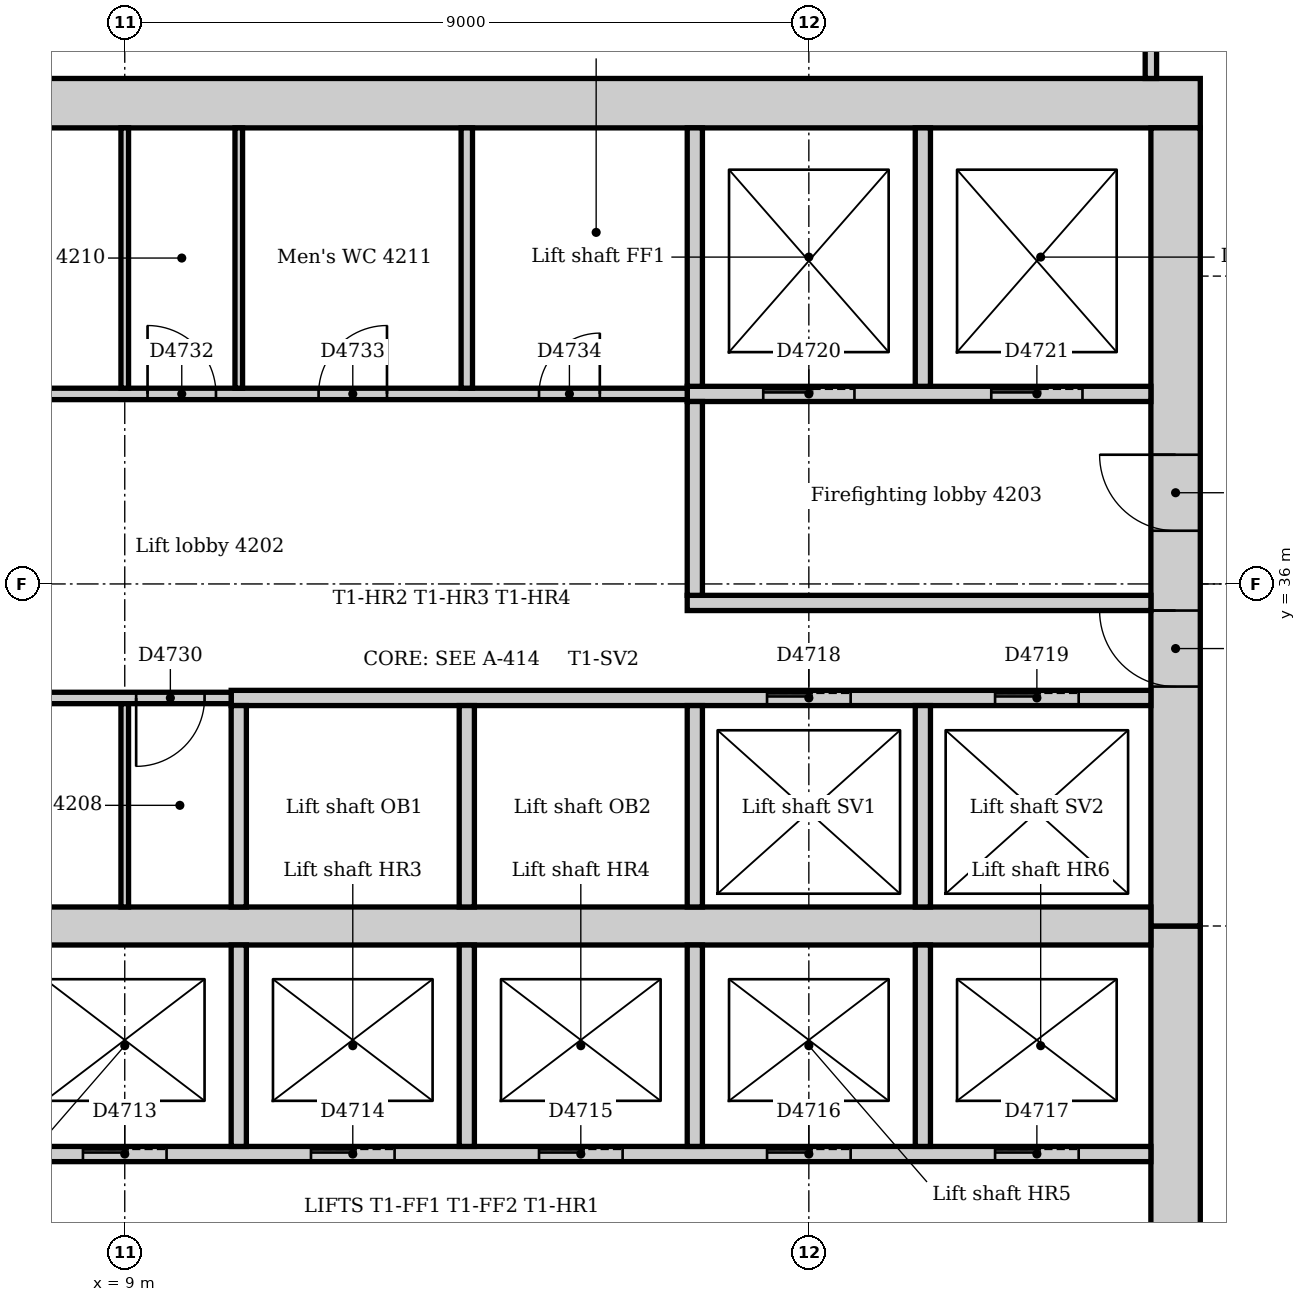
"""IFC4 building model, lengths in metres.
Left out: names, types, materials, properties, quantities, classifications, styles, units other than length and angle.
Written with IfcOpenShell. Run it as: python <this file> out.ifc"""

import sys

from ifc_helpers import new_model, si_unit, direction, frame, frame_2d, origin, place, context, subcontext, project, spatial, rectangle, extrude, element, fill, save


model = new_model("IFC4")
c1 = context("Model", 3, precision=1e-05, world=origin(), true_north=direction((0.0, 1.0)))
c2 = subcontext(c1, "Body", "Model", "MODEL_VIEW")
j1 = project(units=[si_unit("LENGTHUNIT", "METRE"), si_unit("PLANEANGLEUNIT", "RADIAN")], contexts=[c1])
p1 = place(None, origin())
s1 = spatial("IfcSite", under=j1, at=p1, CompositionType="ELEMENT")
p2 = place(p1, origin())
s2 = spatial("IfcBuilding", under=s1, at=p2, CompositionType="ELEMENT")
p3 = place(p2, frame((0.0, 0.0, 177.0)))
s3 = spatial("IfcBuildingStorey", under=s2, at=p3, CompositionType="ELEMENT", Elevation=177.0)
p4 = place(p3, frame((23.15, 42.325, 0.0), z_axis=(0.0, 0.0, 1.0), x_axis=(-1.0, 0.0, 0.0)))
e1 = element("IfcWall", 1, at=p4, inside=s3, PredefinedType="SOLIDWALL", context=c2, shape_type="SweptSolid", body=[
    extrude(rectangle(XDim=19.25, YDim=0.65, at=frame_2d((9.625, 0.0))), origin(), (0.0, 0.0, 1.0), 4.0),
])
p5 = place(p3, frame((22.825, 21.0, 0.0), z_axis=(0.0, 0.0, 1.0), x_axis=(0.0, 1.0, 0.0)))
e2 = element("IfcWall", 2, at=p5, inside=s3, PredefinedType="SOLIDWALL", context=c2, shape_type="SweptSolid", body=[
    extrude(rectangle(XDim=10.5, YDim=0.65, at=frame_2d((5.25, 0.0))), origin(), (0.0, 0.0, 1.0), 4.0),
])
p6 = place(p5, frame((4.35, 0.0, 0.0)))
e3 = element("IfcOpeningElement", 3, at=p6, cuts=e2, PredefinedType="OPENING", context=c2, shape_type="SweptSolid", body=[
    extrude(rectangle(XDim=1.8, YDim=2.1, at=frame_2d((0.9, 1.05))), frame((0.0, 0.335, 0.0), z_axis=(0.0, -1.0, 0.0), x_axis=(1.0, 0.0, 0.0)), (0.0, 0.0, 1.0), 0.67),
])
p7 = place(p3, frame((22.825, 31.5, 0.0), z_axis=(0.0, 0.0, 1.0), x_axis=(0.0, 1.0, 0.0)))
e4 = element("IfcWall", 4, at=p7, inside=s3, PredefinedType="SOLIDWALL", context=c2, shape_type="SweptSolid", body=[
    extrude(rectangle(XDim=10.5, YDim=0.65, at=frame_2d((5.25, 0.0))), origin(), (0.0, 0.0, 1.0), 4.0),
])
p8 = place(p7, frame((3.15, 0.0, 0.0)))
e5 = element("IfcOpeningElement", 5, at=p8, cuts=e4, PredefinedType="OPENING", context=c2, shape_type="SweptSolid", body=[
    extrude(rectangle(XDim=1.0, YDim=2.1, at=frame_2d((0.5, 1.05))), frame((0.0, 0.335, 0.0), z_axis=(0.0, -1.0, 0.0), x_axis=(1.0, 0.0, 0.0)), (0.0, 0.0, 1.0), 0.67),
])
p9 = place(p7, frame((5.2, 0.0, 0.0)))
e6 = element("IfcOpeningElement", 6, at=p9, cuts=e4, PredefinedType="OPENING", context=c2, shape_type="SweptSolid", body=[
    extrude(rectangle(XDim=1.0, YDim=2.1, at=frame_2d((0.5, 1.05))), frame((0.0, 0.335, 0.0), z_axis=(0.0, -1.0, 0.0), x_axis=(1.0, 0.0, 0.0)), (0.0, 0.0, 1.0), 0.67),
])
p10 = place(p3, frame((4.5, 31.5, 0.0), z_axis=(0.0, 0.0, 1.0), x_axis=(1.0, 0.0, 0.0)))
e7 = element("IfcWall", 7, at=p10, inside=s3, PredefinedType="SOLIDWALL", context=c2, shape_type="SweptSolid", body=[
    extrude(rectangle(XDim=18.0, YDim=0.5, at=frame_2d((9.0, 0.0))), origin(), (0.0, 0.0, 1.0), 4.0),
])
p11 = place(p3, frame((16.4, 35.75, 0.0), z_axis=(0.0, 0.0, 1.0), x_axis=(1.0, 0.0, 0.0)))
e8 = element("IfcWall", 8, at=p11, inside=s3, PredefinedType="PARTITIONING", context=c2, shape_type="SweptSolid", body=[
    extrude(rectangle(XDim=6.1, YDim=0.2, at=frame_2d((3.05, 0.0))), origin(), (0.0, 0.0, 1.0), 3.85),
])
p12 = place(p3, frame((16.4, 38.5, 0.0), z_axis=(0.0, 0.0, 1.0), x_axis=(1.0, 0.0, 0.0)))
e9 = element("IfcWall", 9, at=p12, inside=s3, PredefinedType="PARTITIONING", context=c2, shape_type="SweptSolid", body=[
    extrude(rectangle(XDim=6.1, YDim=0.2, at=frame_2d((3.05, 0.0))), origin(), (0.0, 0.0, 1.0), 3.85),
])
p13 = place(p12, frame((1.0, 0.0, 0.0)))
e10 = element("IfcOpeningElement", 10, at=p13, cuts=e9, PredefinedType="OPENING", context=c2, shape_type="SweptSolid", body=[
    extrude(rectangle(XDim=1.2, YDim=2.1, at=frame_2d((0.6, 1.05))), frame((0.0, 0.11, 0.0), z_axis=(0.0, -1.0, 0.0), x_axis=(1.0, 0.0, 0.0)), (0.0, 0.0, 1.0), 0.22),
])
p14 = place(p12, frame((4.0, 0.0, 0.0)))
e11 = element("IfcOpeningElement", 11, at=p14, cuts=e9, PredefinedType="OPENING", context=c2, shape_type="SweptSolid", body=[
    extrude(rectangle(XDim=1.2, YDim=2.1, at=frame_2d((0.6, 1.05))), frame((0.0, 0.11, 0.0), z_axis=(0.0, -1.0, 0.0), x_axis=(1.0, 0.0, 0.0)), (0.0, 0.0, 1.0), 0.22),
])
p15 = place(p3, frame((16.5, 35.85, 0.0), z_axis=(0.0, 0.0, 1.0), x_axis=(0.0, 1.0, 0.0)))
e12 = element("IfcWall", 12, at=p15, inside=s3, PredefinedType="PARTITIONING", context=c2, shape_type="SweptSolid", body=[
    extrude(rectangle(XDim=2.55, YDim=0.2, at=frame_2d((1.275, 0.0))), origin(), (0.0, 0.0, 1.0), 3.85),
])
p16 = place(p3, frame((4.5, 28.5, 0.0), z_axis=(0.0, 0.0, 1.0), x_axis=(1.0, 0.0, 0.0)))
e13 = element("IfcWall", 13, at=p16, inside=s3, PredefinedType="PARTITIONING", context=c2, shape_type="SweptSolid", body=[
    extrude(rectangle(XDim=18.0, YDim=0.2, at=frame_2d((9.0, 0.0))), origin(), (0.0, 0.0, 1.0), 3.85),
])
p17 = place(p16, frame((0.95, 0.0, 0.0)))
e14 = element("IfcOpeningElement", 14, at=p17, cuts=e13, PredefinedType="OPENING", context=c2, shape_type="SweptSolid", body=[
    extrude(rectangle(XDim=1.1, YDim=2.1, at=frame_2d((0.55, 1.05))), frame((0.0, 0.11, 0.0), z_axis=(0.0, -1.0, 0.0), x_axis=(1.0, 0.0, 0.0)), (0.0, 0.0, 1.0), 0.22),
])
p18 = place(p16, frame((3.95, 0.0, 0.0)))
e15 = element("IfcOpeningElement", 15, at=p18, cuts=e13, PredefinedType="OPENING", context=c2, shape_type="SweptSolid", body=[
    extrude(rectangle(XDim=1.1, YDim=2.1, at=frame_2d((0.55, 1.05))), frame((0.0, 0.11, 0.0), z_axis=(0.0, -1.0, 0.0), x_axis=(1.0, 0.0, 0.0)), (0.0, 0.0, 1.0), 0.22),
])
p19 = place(p16, frame((6.95, 0.0, 0.0)))
e16 = element("IfcOpeningElement", 16, at=p19, cuts=e13, PredefinedType="OPENING", context=c2, shape_type="SweptSolid", body=[
    extrude(rectangle(XDim=1.1, YDim=2.1, at=frame_2d((0.55, 1.05))), frame((0.0, 0.11, 0.0), z_axis=(0.0, -1.0, 0.0), x_axis=(1.0, 0.0, 0.0)), (0.0, 0.0, 1.0), 0.22),
])
p20 = place(p16, frame((9.95, 0.0, 0.0)))
e17 = element("IfcOpeningElement", 17, at=p20, cuts=e13, PredefinedType="OPENING", context=c2, shape_type="SweptSolid", body=[
    extrude(rectangle(XDim=1.1, YDim=2.1, at=frame_2d((0.55, 1.05))), frame((0.0, 0.11, 0.0), z_axis=(0.0, -1.0, 0.0), x_axis=(1.0, 0.0, 0.0)), (0.0, 0.0, 1.0), 0.22),
])
p21 = place(p16, frame((12.95, 0.0, 0.0)))
e18 = element("IfcOpeningElement", 18, at=p21, cuts=e13, PredefinedType="OPENING", context=c2, shape_type="SweptSolid", body=[
    extrude(rectangle(XDim=1.1, YDim=2.1, at=frame_2d((0.55, 1.05))), frame((0.0, 0.11, 0.0), z_axis=(0.0, -1.0, 0.0), x_axis=(1.0, 0.0, 0.0)), (0.0, 0.0, 1.0), 0.22),
])
p22 = place(p16, frame((15.95, 0.0, 0.0)))
e19 = element("IfcOpeningElement", 19, at=p22, cuts=e13, PredefinedType="OPENING", context=c2, shape_type="SweptSolid", body=[
    extrude(rectangle(XDim=1.1, YDim=2.1, at=frame_2d((0.55, 1.05))), frame((0.0, 0.11, 0.0), z_axis=(0.0, -1.0, 0.0), x_axis=(1.0, 0.0, 0.0)), (0.0, 0.0, 1.0), 0.22),
])
p23 = place(p3, frame((10.4, 34.5, 0.0), z_axis=(0.0, 0.0, 1.0), x_axis=(1.0, 0.0, 0.0)))
e20 = element("IfcWall", 20, at=p23, inside=s3, PredefinedType="PARTITIONING", context=c2, shape_type="SweptSolid", body=[
    extrude(rectangle(XDim=12.1, YDim=0.2, at=frame_2d((6.05, 0.0))), origin(), (0.0, 0.0, 1.0), 3.85),
])
p24 = place(p23, frame((7.05, 0.0, 0.0)))
e21 = element("IfcOpeningElement", 21, at=p24, cuts=e20, PredefinedType="OPENING", context=c2, shape_type="SweptSolid", body=[
    extrude(rectangle(XDim=1.1, YDim=2.1, at=frame_2d((0.55, 1.05))), frame((0.0, 0.11, 0.0), z_axis=(0.0, -1.0, 0.0), x_axis=(1.0, 0.0, 0.0)), (0.0, 0.0, 1.0), 0.22),
])
p25 = place(p23, frame((10.05, 0.0, 0.0)))
e22 = element("IfcOpeningElement", 22, at=p25, cuts=e20, PredefinedType="OPENING", context=c2, shape_type="SweptSolid", body=[
    extrude(rectangle(XDim=1.1, YDim=2.1, at=frame_2d((0.55, 1.05))), frame((0.0, 0.11, 0.0), z_axis=(0.0, -1.0, 0.0), x_axis=(1.0, 0.0, 0.0)), (0.0, 0.0, 1.0), 0.22),
])
for number, where, z_axis, x_axis in (
    (23, (10.5, 28.6, 0.0), (0.0, 0.0, 1.0), (0.0, 1.0, 0.0)),
    (24, (10.5, 31.75, 0.0), (0.0, 0.0, 1.0), (0.0, 1.0, 0.0)),
    (25, (13.5, 28.6, 0.0), (0.0, 0.0, 1.0), (0.0, 1.0, 0.0)),
    (26, (13.5, 31.75, 0.0), (0.0, 0.0, 1.0), (0.0, 1.0, 0.0)),
    (27, (16.5, 28.6, 0.0), (0.0, 0.0, 1.0), (0.0, 1.0, 0.0)),
    (28, (16.5, 31.75, 0.0), (0.0, 0.0, 1.0), (0.0, 1.0, 0.0)),
    (29, (19.5, 28.6, 0.0), (0.0, 0.0, 1.0), (0.0, 1.0, 0.0)),
    (30, (19.5, 31.75, 0.0), (0.0, 0.0, 1.0), (0.0, 1.0, 0.0)),
):
    element("IfcWall", number, at=place(p3, frame(where, z_axis=z_axis, x_axis=x_axis)), inside=s3, PredefinedType="PARTITIONING", context=c2, shape_type="SweptSolid", body=[
        extrude(rectangle(XDim=2.65, YDim=0.2, at=frame_2d((1.325, 0.0))), origin(), (0.0, 0.0, 1.0), 3.85),
    ])
for number, where, z_axis, x_axis in (
    (31, (16.5, 38.6, 0.0), (0.0, 0.0, 1.0), (0.0, 1.0, 0.0)),
    (32, (19.5, 38.6, 0.0), (0.0, 0.0, 1.0), (0.0, 1.0, 0.0)),
):
    element("IfcWall", number, at=place(p3, frame(where, z_axis=z_axis, x_axis=x_axis)), inside=s3, PredefinedType="PARTITIONING", context=c2, shape_type="SweptSolid", body=[
        extrude(rectangle(XDim=3.4, YDim=0.2, at=frame_2d((1.7, 0.0))), origin(), (0.0, 0.0, 1.0), 3.85),
    ])
p26 = place(p3, frame((4.5, 38.5, 0.0), z_axis=(0.0, 0.0, 1.0), x_axis=(1.0, 0.0, 0.0)))
e33 = element("IfcWall", 33, at=p26, inside=s3, PredefinedType="PARTITIONING", context=c2, shape_type="SweptSolid", body=[
    extrude(rectangle(XDim=11.9, YDim=0.15, at=frame_2d((5.95, 0.0))), origin(), (0.0, 0.0, 1.0), 3.85),
])
p27 = place(p26, frame((1.85, 0.0, 0.0)))
e34 = element("IfcOpeningElement", 34, at=p27, cuts=e33, PredefinedType="OPENING", context=c2, shape_type="SweptSolid", body=[
    extrude(rectangle(XDim=0.9, YDim=2.1, at=frame_2d((0.45, 1.05))), frame((0.0, 0.085, 0.0), z_axis=(0.0, -1.0, 0.0), x_axis=(1.0, 0.0, 0.0)), (0.0, 0.0, 1.0), 0.17),
])
p28 = place(p26, frame((4.8, 0.0, 0.0)))
e35 = element("IfcOpeningElement", 35, at=p28, cuts=e33, PredefinedType="OPENING", context=c2, shape_type="SweptSolid", body=[
    extrude(rectangle(XDim=0.9, YDim=2.1, at=frame_2d((0.45, 1.05))), frame((0.0, 0.085, 0.0), z_axis=(0.0, -1.0, 0.0), x_axis=(1.0, 0.0, 0.0)), (0.0, 0.0, 1.0), 0.17),
])
p29 = place(p26, frame((7.05, 0.0, 0.0)))
e36 = element("IfcOpeningElement", 36, at=p29, cuts=e33, PredefinedType="OPENING", context=c2, shape_type="SweptSolid", body=[
    extrude(rectangle(XDim=0.9, YDim=2.1, at=frame_2d((0.45, 1.05))), frame((0.0, 0.085, 0.0), z_axis=(0.0, -1.0, 0.0), x_axis=(1.0, 0.0, 0.0)), (0.0, 0.0, 1.0), 0.17),
])
p30 = place(p26, frame((9.95, 0.0, 0.0)))
e37 = element("IfcOpeningElement", 37, at=p30, cuts=e33, PredefinedType="OPENING", context=c2, shape_type="SweptSolid", body=[
    extrude(rectangle(XDim=0.8, YDim=2.1, at=frame_2d((0.4, 1.05))), frame((0.0, 0.085, 0.0), z_axis=(0.0, -1.0, 0.0), x_axis=(1.0, 0.0, 0.0)), (0.0, 0.0, 1.0), 0.17),
])
p31 = place(p3, frame((4.5, 34.5, 0.0), z_axis=(0.0, 0.0, 1.0), x_axis=(1.0, 0.0, 0.0)))
e38 = element("IfcWall", 38, at=p31, inside=s3, PredefinedType="PARTITIONING", context=c2, shape_type="SweptSolid", body=[
    extrude(rectangle(XDim=5.9, YDim=0.15, at=frame_2d((2.95, 0.0))), origin(), (0.0, 0.0, 1.0), 3.85),
])
p32 = place(p31, frame((1.85, 0.0, 0.0)))
e39 = element("IfcOpeningElement", 39, at=p32, cuts=e38, PredefinedType="OPENING", context=c2, shape_type="SweptSolid", body=[
    extrude(rectangle(XDim=0.9, YDim=2.1, at=frame_2d((0.45, 1.05))), frame((0.0, 0.085, 0.0), z_axis=(0.0, -1.0, 0.0), x_axis=(1.0, 0.0, 0.0)), (0.0, 0.0, 1.0), 0.17),
])
p33 = place(p31, frame((4.65, 0.0, 0.0)))
e40 = element("IfcOpeningElement", 40, at=p33, cuts=e38, PredefinedType="OPENING", context=c2, shape_type="SweptSolid", body=[
    extrude(rectangle(XDim=0.9, YDim=2.1, at=frame_2d((0.45, 1.05))), frame((0.0, 0.085, 0.0), z_axis=(0.0, -1.0, 0.0), x_axis=(1.0, 0.0, 0.0)), (0.0, 0.0, 1.0), 0.17),
])
p34 = place(p3, frame((22.5, 42.65, 0.0), z_axis=(0.0, 0.0, 1.0), x_axis=(0.0, 1.0, 0.0)))
e41 = element("IfcWall", 41, at=p34, inside=s3, PredefinedType="PARTITIONING", context=c2, shape_type="SweptSolid", body=[
    extrude(rectangle(XDim=1.825, YDim=0.15, at=frame_2d((0.912, 0.0))), origin(), (0.0, 0.0, 1.0), 3.85),
])
p35 = place(p3, frame((13.5, 38.575, 0.0), z_axis=(0.0, 0.0, 1.0), x_axis=(0.0, 1.0, 0.0)))
e42 = element("IfcWall", 42, at=p35, inside=s3, PredefinedType="PARTITIONING", context=c2, shape_type="SweptSolid", body=[
    extrude(rectangle(XDim=3.425, YDim=0.15, at=frame_2d((1.712, 0.0))), origin(), (0.0, 0.0, 1.0), 3.85),
])
for number, where, z_axis, x_axis in (
    (43, (9.0, 38.575, 0.0), (0.0, 0.0, 1.0), (0.0, 1.0, 0.0)),
    (44, (10.5, 38.575, 0.0), (0.0, 0.0, 1.0), (0.0, 1.0, 0.0)),
):
    element("IfcWall", number, at=place(p3, frame(where, z_axis=z_axis, x_axis=x_axis)), inside=s3, PredefinedType="PARTITIONING", context=c2, shape_type="SweptSolid", body=[
        extrude(rectangle(XDim=3.425, YDim=0.1, at=frame_2d((1.712, 0.0))), origin(), (0.0, 0.0, 1.0), 3.85),
    ])
p36 = place(p3, frame((9.0, 31.75, 0.0), z_axis=(0.0, 0.0, 1.0), x_axis=(0.0, 1.0, 0.0)))
e45 = element("IfcWall", 45, at=p36, inside=s3, PredefinedType="PARTITIONING", context=c2, shape_type="SweptSolid", body=[
    extrude(rectangle(XDim=2.675, YDim=0.1, at=frame_2d((1.337, 0.0))), origin(), (0.0, 0.0, 1.0), 3.85),
])
p37 = place(p18, origin())
e46 = element("IfcDoor", 46, at=p37, inside=s3, OperationType="SLIDING_TO_LEFT", PredefinedType="DOOR", context=c2, shape_type="SweptSolid", body=[
    extrude(rectangle(XDim=1.1, YDim=2.1, at=frame_2d((0.55, 1.05))), frame((0.0, 0.025, 0.0), z_axis=(0.0, -1.0, 0.0), x_axis=(1.0, 0.0, 0.0)), (0.0, 0.0, 1.0), 0.05),
])
fill(e15, e46)
p38 = place(p19, origin())
e47 = element("IfcDoor", 47, at=p38, inside=s3, OperationType="SLIDING_TO_LEFT", PredefinedType="DOOR", context=c2, shape_type="SweptSolid", body=[
    extrude(rectangle(XDim=1.1, YDim=2.1, at=frame_2d((0.55, 1.05))), frame((0.0, 0.025, 0.0), z_axis=(0.0, -1.0, 0.0), x_axis=(1.0, 0.0, 0.0)), (0.0, 0.0, 1.0), 0.05),
])
fill(e16, e47)
p39 = place(p20, origin())
e48 = element("IfcDoor", 48, at=p39, inside=s3, OperationType="SLIDING_TO_LEFT", PredefinedType="DOOR", context=c2, shape_type="SweptSolid", body=[
    extrude(rectangle(XDim=1.1, YDim=2.1, at=frame_2d((0.55, 1.05))), frame((0.0, 0.025, 0.0), z_axis=(0.0, -1.0, 0.0), x_axis=(1.0, 0.0, 0.0)), (0.0, 0.0, 1.0), 0.05),
])
fill(e17, e48)
p40 = place(p21, origin())
e49 = element("IfcDoor", 49, at=p40, inside=s3, OperationType="SLIDING_TO_LEFT", PredefinedType="DOOR", context=c2, shape_type="SweptSolid", body=[
    extrude(rectangle(XDim=1.1, YDim=2.1, at=frame_2d((0.55, 1.05))), frame((0.0, 0.025, 0.0), z_axis=(0.0, -1.0, 0.0), x_axis=(1.0, 0.0, 0.0)), (0.0, 0.0, 1.0), 0.05),
])
fill(e18, e49)
p41 = place(p22, origin())
e50 = element("IfcDoor", 50, at=p41, inside=s3, OperationType="SLIDING_TO_LEFT", PredefinedType="DOOR", context=c2, shape_type="SweptSolid", body=[
    extrude(rectangle(XDim=1.1, YDim=2.1, at=frame_2d((0.55, 1.05))), frame((0.0, 0.025, 0.0), z_axis=(0.0, -1.0, 0.0), x_axis=(1.0, 0.0, 0.0)), (0.0, 0.0, 1.0), 0.05),
])
fill(e19, e50)
p42 = place(p24, origin())
e51 = element("IfcDoor", 51, at=p42, inside=s3, OperationType="SLIDING_TO_LEFT", PredefinedType="DOOR", context=c2, shape_type="SweptSolid", body=[
    extrude(rectangle(XDim=1.1, YDim=2.1, at=frame_2d((0.55, 1.05))), frame((0.0, 0.025, 0.0), z_axis=(0.0, -1.0, 0.0), x_axis=(1.0, 0.0, 0.0)), (0.0, 0.0, 1.0), 0.05),
])
fill(e21, e51)
p43 = place(p25, origin())
e52 = element("IfcDoor", 52, at=p43, inside=s3, OperationType="SLIDING_TO_LEFT", PredefinedType="DOOR", context=c2, shape_type="SweptSolid", body=[
    extrude(rectangle(XDim=1.1, YDim=2.1, at=frame_2d((0.55, 1.05))), frame((0.0, 0.025, 0.0), z_axis=(0.0, -1.0, 0.0), x_axis=(1.0, 0.0, 0.0)), (0.0, 0.0, 1.0), 0.05),
])
fill(e22, e52)
p44 = place(p13, origin())
e53 = element("IfcDoor", 53, at=p44, inside=s3, OperationType="SLIDING_TO_LEFT", PredefinedType="DOOR", context=c2, shape_type="SweptSolid", body=[
    extrude(rectangle(XDim=1.2, YDim=2.1, at=frame_2d((0.6, 1.05))), frame((0.0, 0.025, 0.0), z_axis=(0.0, -1.0, 0.0), x_axis=(1.0, 0.0, 0.0)), (0.0, 0.0, 1.0), 0.05),
])
fill(e10, e53)
p45 = place(p14, origin())
e54 = element("IfcDoor", 54, at=p45, inside=s3, OperationType="SLIDING_TO_LEFT", PredefinedType="DOOR", context=c2, shape_type="SweptSolid", body=[
    extrude(rectangle(XDim=1.2, YDim=2.1, at=frame_2d((0.6, 1.05))), frame((0.0, 0.025, 0.0), z_axis=(0.0, -1.0, 0.0), x_axis=(1.0, 0.0, 0.0)), (0.0, 0.0, 1.0), 0.05),
])
fill(e11, e54)
p46 = place(p8, origin())
e55 = element("IfcDoor", 55, at=p46, inside=s3, OperationType="SINGLE_SWING_RIGHT", PredefinedType="DOOR", context=c2, shape_type="SweptSolid", body=[
    extrude(rectangle(XDim=1.0, YDim=2.1, at=frame_2d((0.5, 1.05))), frame((0.0, 0.025, 0.0), z_axis=(0.0, -1.0, 0.0), x_axis=(1.0, 0.0, 0.0)), (0.0, 0.0, 1.0), 0.05),
])
fill(e5, e55)
p47 = place(p9, origin())
e56 = element("IfcDoor", 56, at=p47, inside=s3, OperationType="SINGLE_SWING_RIGHT", PredefinedType="DOOR", context=c2, shape_type="SweptSolid", body=[
    extrude(rectangle(XDim=1.0, YDim=2.1, at=frame_2d((0.5, 1.05))), frame((0.0, 0.025, 0.0), z_axis=(0.0, -1.0, 0.0), x_axis=(1.0, 0.0, 0.0)), (0.0, 0.0, 1.0), 0.05),
])
fill(e6, e56)
p48 = place(p33, frame((0.9, 0.0, 0.0), z_axis=(0.0, 0.0, 1.0), x_axis=(-1.0, 0.0, 0.0)))
e57 = element("IfcDoor", 57, at=p48, inside=s3, OperationType="SINGLE_SWING_RIGHT", PredefinedType="DOOR", context=c2, shape_type="SweptSolid", body=[
    extrude(rectangle(XDim=0.9, YDim=2.1, at=frame_2d((0.45, 1.05))), frame((0.0, 0.025, 0.0), z_axis=(0.0, -1.0, 0.0), x_axis=(1.0, 0.0, 0.0)), (0.0, 0.0, 1.0), 0.05),
])
fill(e40, e57)
p49 = place(p28, origin())
e58 = element("IfcDoor", 58, at=p49, inside=s3, OperationType="SINGLE_SWING_LEFT", PredefinedType="DOOR", context=c2, shape_type="SweptSolid", body=[
    extrude(rectangle(XDim=0.9, YDim=2.1, at=frame_2d((0.45, 1.05))), frame((0.0, 0.025, 0.0), z_axis=(0.0, -1.0, 0.0), x_axis=(1.0, 0.0, 0.0)), (0.0, 0.0, 1.0), 0.05),
])
fill(e35, e58)
p50 = place(p29, origin())
e59 = element("IfcDoor", 59, at=p50, inside=s3, OperationType="SINGLE_SWING_RIGHT", PredefinedType="DOOR", context=c2, shape_type="SweptSolid", body=[
    extrude(rectangle(XDim=0.9, YDim=2.1, at=frame_2d((0.45, 1.05))), frame((0.0, 0.025, 0.0), z_axis=(0.0, -1.0, 0.0), x_axis=(1.0, 0.0, 0.0)), (0.0, 0.0, 1.0), 0.05),
])
fill(e36, e59)
p51 = place(p30, origin())
e60 = element("IfcDoor", 60, at=p51, inside=s3, OperationType="SINGLE_SWING_RIGHT", PredefinedType="DOOR", context=c2, shape_type="SweptSolid", body=[
    extrude(rectangle(XDim=0.8, YDim=2.1, at=frame_2d((0.4, 1.05))), frame((0.0, 0.025, 0.0), z_axis=(0.0, -1.0, 0.0), x_axis=(1.0, 0.0, 0.0)), (0.0, 0.0, 1.0), 0.05),
])
fill(e37, e60)
save(model, sys.argv[1])
